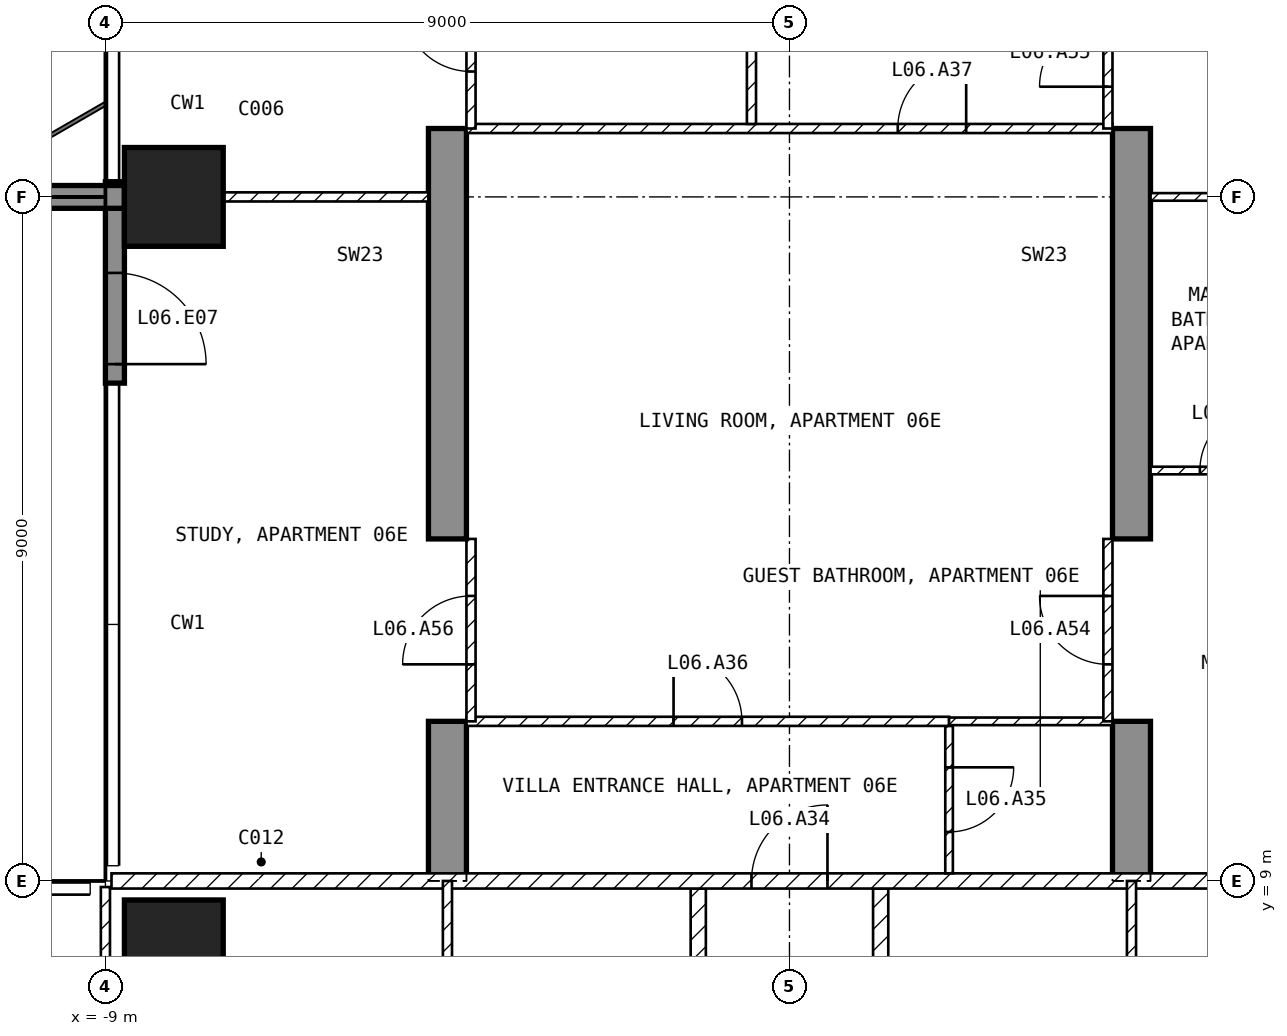
"""IFC4 building model, lengths in metres.
Left out: names, types, materials, properties, quantities, classifications, styles, units other than length and angle.
Written with IfcOpenShell. Run it as: python <this file> out.ifc"""

import sys

from ifc_helpers import new_model, si_unit, direction, frame, frame_2d, origin, origin_2d, place, context, subcontext, project, spatial, polyline, rectangle, outline, extrude, element, fill, save


model = new_model("IFC4")
c1 = context("Model", 3, precision=1e-05, world=origin(), true_north=direction((0.0, 1.0)))
c2 = subcontext(c1, "Body", "Model", "MODEL_VIEW")
j1 = project(units=[si_unit("LENGTHUNIT", "METRE"), si_unit("PLANEANGLEUNIT", "RADIAN")], contexts=[c1])
p1 = place(None, origin())
s1 = spatial("IfcSite", under=j1, at=p1, CompositionType="ELEMENT")
p2 = place(p1, origin())
s2 = spatial("IfcBuilding", under=s1, at=p2, CompositionType="ELEMENT")
p3 = place(p2, frame((0.0, 0.0, 40.0)))
s3 = spatial("IfcBuildingStorey", under=s2, at=p3, CompositionType="ELEMENT", Elevation=40.0)
for number, where, z_axis, x_axis in (
    (1, (-8.1, 8.1, -0.25), (0.0, 0.0, 1.0), (1.0, 0.0, 0.0)),
    (2, (-8.1, 18.0, -0.25), (0.0, 0.0, 1.0), (1.0, 0.0, 0.0)),
):
    element("IfcColumn", number, at=place(p3, frame(where, z_axis=z_axis, x_axis=x_axis)), inside=s3, PredefinedType="COLUMN", context=c2, shape_type="SweptSolid", body=[
        extrude(rectangle(XDim=1.3, YDim=1.3, at=origin_2d()), origin(), (0.0, 0.0, 1.0), 3.5),
    ])
for number, where, z_axis, x_axis in (
    (3, (-4.75, 9.0, -0.25), (1.0, 0.0, 0.0), (0.0, 1.0, 0.0)),
    (4, (4.25, 9.0, -0.25), (1.0, 0.0, 0.0), (0.0, 1.0, 0.0)),
):
    element("IfcWall", number, at=place(p3, frame(where, z_axis=z_axis, x_axis=x_axis)), inside=s3, PredefinedType="SHEAR", context=c2, shape_type="SweptSolid", body=[
        extrude(outline(polyline([(0.0, 0.0), (2.1, 0.0), (2.1, 2.65), (4.5, 2.65), (4.5, 0.0), (9.9, 0.0), (9.9, 2.65), (12.3, 2.65), (12.3, 0.0), (16.45, 0.0), (16.45, 3.5), (0.0, 3.5), (0.0, 0.0)])), origin(), (0.0, 0.0, 1.0), 0.5),
    ])
p4 = place(p3, frame((-8.875, 18.2, 0.0), z_axis=(0.0, 0.0, 1.0), x_axis=(0.0, -1.0, 0.0)))
e5 = element("IfcWall", 5, at=p4, inside=s3, PredefinedType="SOLIDWALL", context=c2, shape_type="SweptSolid", body=[
    extrude(rectangle(XDim=2.65, YDim=0.25, at=frame_2d((1.325, 0.0))), origin(), (0.0, 0.0, 1.0), 3.25),
])
p5 = place(p4, frame((1.2, 0.0, 0.0)))
e6 = element("IfcOpeningElement", 6, at=p5, cuts=e5, PredefinedType="OPENING", context=c2, shape_type="SweptSolid", body=[
    extrude(rectangle(XDim=1.2, YDim=2.4, at=frame_2d((0.6, 1.2))), frame((0.0, 0.135, 0.0), z_axis=(0.0, -1.0, 0.0), x_axis=(1.0, 0.0, 0.0)), (0.0, 0.0, 1.0), 0.27),
])
p6 = place(p3, frame((-8.75, 18.0, 0.0), z_axis=(0.0, 0.0, 1.0), x_axis=(-1.0, 0.0, 0.0)))
e7 = element("IfcWall", 7, at=p6, inside=s3, PredefinedType="SOLIDWALL", context=c2, shape_type="SweptSolid", body=[
    extrude(rectangle(XDim=2.95, YDim=0.3, at=frame_2d((1.475, 0.0))), origin(), (0.0, 0.0, 1.0), 3.25),
])
for number, where, z_axis, x_axis in (
    (8, (1.2, 8.9, 0.0), (0.0, 0.0, 1.0), (0.0, -1.0, 0.0)),
    (9, (-1.2, 1.3, 0.0), (0.0, 0.0, 1.0), (0.0, 1.0, 0.0)),
):
    element("IfcWall", number, at=place(p3, frame(where, z_axis=z_axis, x_axis=x_axis)), inside=s3, PredefinedType="PARTITIONING", context=c2, shape_type="SweptSolid", body=[
        extrude(rectangle(XDim=7.6, YDim=0.2, at=frame_2d((3.8, 0.0))), origin(), (0.0, 0.0, 1.0), 3.25),
    ])
p7 = place(p3, frame((-8.92, 9.0, 0.0), z_axis=(0.0, 0.0, 1.0), x_axis=(1.0, 0.0, 0.0)))
e10 = element("IfcWall", 10, at=p7, inside=s3, PredefinedType="PARTITIONING", context=c2, shape_type="SweptSolid", body=[
    extrude(rectangle(XDim=17.84, YDim=0.2, at=frame_2d((8.92, 0.0))), origin(), (0.0, 0.0, 1.0), 3.25),
])
p8 = place(p7, frame((8.42, 0.0, 0.0)))
e11 = element("IfcOpeningElement", 11, at=p8, cuts=e10, PredefinedType="OPENING", context=c2, shape_type="SweptSolid", body=[
    extrude(rectangle(XDim=1.0, YDim=2.1, at=frame_2d((0.5, 1.05))), frame((0.0, 0.11, 0.0), z_axis=(0.0, -1.0, 0.0), x_axis=(1.0, 0.0, 0.0)), (0.0, 0.0, 1.0), 0.22),
])
p9 = place(p3, frame((4.5, 5.1, 0.0), z_axis=(0.0, 0.0, 1.0), x_axis=(0.0, 1.0, 0.0)))
e12 = element("IfcWall", 12, at=p9, inside=s3, PredefinedType="PARTITIONING", context=c2, shape_type="SweptSolid", body=[
    extrude(rectangle(XDim=3.9, YDim=0.12, at=frame_2d((1.95, 0.0))), origin(), (0.0, 0.0, 1.0), 3.25),
])
p10 = place(p9, frame((1.5, 0.0, 0.0)))
e13 = element("IfcOpeningElement", 13, at=p10, cuts=e12, PredefinedType="OPENING", context=c2, shape_type="SweptSolid", body=[
    extrude(rectangle(XDim=0.9, YDim=2.1, at=frame_2d((0.45, 1.05))), frame((0.0, 0.07, 0.0), z_axis=(0.0, -1.0, 0.0), x_axis=(1.0, 0.0, 0.0)), (0.0, 0.0, 1.0), 0.14),
])
p11 = place(p3, frame((-9.0, 8.92, 0.0), z_axis=(0.0, 0.0, 1.0), x_axis=(0.0, -1.0, 0.0)))
e14 = element("IfcWall", 14, at=p11, inside=s3, PredefinedType="PARTITIONING", context=c2, shape_type="SweptSolid", body=[
    extrude(rectangle(XDim=5.02, YDim=0.12, at=frame_2d((2.51, 0.0))), origin(), (0.0, 0.0, 1.0), 3.25),
])
p12 = place(p11, frame((2.682, 0.0, 0.0)))
e15 = element("IfcOpeningElement", 15, at=p12, cuts=e14, PredefinedType="OPENING", context=c2, shape_type="SweptSolid", body=[
    extrude(rectangle(XDim=0.9, YDim=2.1, at=frame_2d((0.45, 1.05))), frame((0.0, 0.07, 0.0), z_axis=(0.0, -1.0, 0.0), x_axis=(1.0, 0.0, 0.0)), (0.0, 0.0, 1.0), 0.14),
])
p13 = place(p3, frame((-4.5, 9.0, 0.0), z_axis=(0.0, 0.0, 1.0), x_axis=(0.0, -1.0, 0.0)))
e16 = element("IfcWall", 16, at=p13, inside=s3, PredefinedType="PARTITIONING", context=c2, shape_type="SweptSolid", body=[
    extrude(rectangle(XDim=7.7, YDim=0.12, at=frame_2d((3.85, 0.0))), origin(), (0.0, 0.0, 1.0), 3.25),
])
p14 = place(p13, frame((1.812, 0.0, 0.0)))
e17 = element("IfcOpeningElement", 17, at=p14, cuts=e16, PredefinedType="OPENING", context=c2, shape_type="SweptSolid", body=[
    extrude(rectangle(XDim=0.9, YDim=2.1, at=frame_2d((0.45, 1.05))), frame((0.0, 0.07, 0.0), z_axis=(0.0, -1.0, 0.0), x_axis=(1.0, 0.0, 0.0)), (0.0, 0.0, 1.0), 0.14),
])
p15 = place(p3, frame((2.1, 11.04, 0.0), z_axis=(0.0, 0.0, 1.0), x_axis=(0.0, -1.0, 0.0)))
e18 = element("IfcWall", 18, at=p15, inside=s3, PredefinedType="PARTITIONING", context=c2, shape_type="SweptSolid", body=[
    extrude(rectangle(XDim=1.94, YDim=0.1, at=frame_2d((0.97, 0.0))), origin(), (0.0, 0.0, 1.0), 3.25),
])
p16 = place(p15, frame((0.545, 0.0, 0.0)))
e19 = element("IfcOpeningElement", 19, at=p16, cuts=e18, PredefinedType="OPENING", context=c2, shape_type="SweptSolid", body=[
    extrude(rectangle(XDim=0.85, YDim=2.1, at=frame_2d((0.425, 1.05))), frame((0.0, 0.06, 0.0), z_axis=(0.0, -1.0, 0.0), x_axis=(1.0, 0.0, 0.0)), (0.0, 0.0, 1.0), 0.12),
])
p17 = place(p3, frame((-4.25, 11.1, 0.0), z_axis=(0.0, 0.0, 1.0), x_axis=(1.0, 0.0, 0.0)))
e20 = element("IfcWall", 20, at=p17, inside=s3, PredefinedType="PARTITIONING", context=c2, shape_type="SweptSolid", body=[
    extrude(rectangle(XDim=6.35, YDim=0.12, at=frame_2d((3.175, 0.0))), origin(), (0.0, 0.0, 1.0), 3.25),
])
p18 = place(p17, frame((2.725, 0.0, 0.0)))
e21 = element("IfcOpeningElement", 21, at=p18, cuts=e20, PredefinedType="OPENING", context=c2, shape_type="SweptSolid", body=[
    extrude(rectangle(XDim=0.9, YDim=2.1, at=frame_2d((0.45, 1.05))), frame((0.0, 0.07, 0.0), z_axis=(0.0, -1.0, 0.0), x_axis=(1.0, 0.0, 0.0)), (0.0, 0.0, 1.0), 0.14),
])
p19 = place(p3, frame((2.1, 11.1, 0.0), z_axis=(0.0, 0.0, 1.0), x_axis=(1.0, 0.0, 0.0)))
e22 = element("IfcWall", 22, at=p19, inside=s3, PredefinedType="PARTITIONING", context=c2, shape_type="SweptSolid", body=[
    extrude(rectangle(XDim=2.15, YDim=0.1, at=frame_2d((1.075, 0.0))), origin(), (0.0, 0.0, 1.0), 3.25),
])
p20 = place(p3, frame((-4.25, 18.9, 0.0), z_axis=(0.0, 0.0, 1.0), x_axis=(1.0, 0.0, 0.0)))
e23 = element("IfcWall", 23, at=p20, inside=s3, PredefinedType="PARTITIONING", context=c2, shape_type="SweptSolid", body=[
    extrude(rectangle(XDim=8.5, YDim=0.12, at=frame_2d((4.25, 0.0))), origin(), (0.0, 0.0, 1.0), 3.25),
])
p21 = place(p20, frame((5.675, 0.0, 0.0)))
e24 = element("IfcOpeningElement", 24, at=p21, cuts=e23, PredefinedType="OPENING", context=c2, shape_type="SweptSolid", body=[
    extrude(rectangle(XDim=0.9, YDim=2.1, at=frame_2d((0.45, 1.05))), frame((0.0, 0.07, 0.0), z_axis=(0.0, -1.0, 0.0), x_axis=(1.0, 0.0, 0.0)), (0.0, 0.0, 1.0), 0.14),
])
p22 = place(p3, frame((-0.5, 18.96, 0.0), z_axis=(0.0, 0.0, 1.0), x_axis=(0.0, 1.0, 0.0)))
e25 = element("IfcWall", 25, at=p22, inside=s3, PredefinedType="PARTITIONING", context=c2, shape_type="SweptSolid", body=[
    extrude(rectangle(XDim=4.38, YDim=0.12, at=frame_2d((2.19, 0.0))), origin(), (0.0, 0.0, 1.0), 3.25),
])
p23 = place(p22, frame((1.74, 0.0, 0.0)))
e26 = element("IfcOpeningElement", 26, at=p23, cuts=e25, PredefinedType="OPENING", context=c2, shape_type="SweptSolid", body=[
    extrude(rectangle(XDim=0.9, YDim=2.1, at=frame_2d((0.45, 1.05))), frame((0.0, 0.07, 0.0), z_axis=(0.0, -1.0, 0.0), x_axis=(1.0, 0.0, 0.0)), (0.0, 0.0, 1.0), 0.14),
])
p24 = place(p3, frame((4.75, 14.4, 0.0), z_axis=(0.0, 0.0, 1.0), x_axis=(1.0, 0.0, 0.0)))
e27 = element("IfcWall", 27, at=p24, inside=s3, PredefinedType="PARTITIONING", context=c2, shape_type="SweptSolid", body=[
    extrude(rectangle(XDim=2.2, YDim=0.1, at=frame_2d((1.1, 0.0))), origin(), (0.0, 0.0, 1.0), 3.25),
])
p25 = place(p24, frame((0.65, 0.0, 0.0)))
e28 = element("IfcOpeningElement", 28, at=p25, cuts=e27, PredefinedType="OPENING", context=c2, shape_type="SweptSolid", body=[
    extrude(rectangle(XDim=0.85, YDim=2.1, at=frame_2d((0.425, 1.05))), frame((0.0, 0.06, 0.0), z_axis=(0.0, -1.0, 0.0), x_axis=(1.0, 0.0, 0.0)), (0.0, 0.0, 1.0), 0.12),
])
p26 = place(p3, frame((4.75, 18.0, 0.0), z_axis=(0.0, 0.0, 1.0), x_axis=(1.0, 0.0, 0.0)))
e29 = element("IfcWall", 29, at=p26, inside=s3, PredefinedType="PARTITIONING", context=c2, shape_type="SweptSolid", body=[
    extrude(rectangle(XDim=2.15, YDim=0.1, at=frame_2d((1.075, 0.0))), origin(), (0.0, 0.0, 1.0), 2.346),
])
p27 = place(p3, frame((-7.45, 18.0, 0.0), z_axis=(0.0, 0.0, 1.0), x_axis=(1.0, 0.0, 0.0)))
e30 = element("IfcWall", 30, at=p27, inside=s3, PredefinedType="PARTITIONING", context=c2, shape_type="SweptSolid", body=[
    extrude(rectangle(XDim=2.7, YDim=0.12, at=frame_2d((1.35, 0.0))), origin(), (0.0, 0.0, 1.0), 2.346),
])
p28 = place(p3, frame((4.19, 11.1, 0.0), z_axis=(0.0, 0.0, 1.0), x_axis=(0.0, 1.0, 0.0)))
e31 = element("IfcWall", 31, at=p28, inside=s3, PredefinedType="PARTITIONING", context=c2, shape_type="SweptSolid", body=[
    extrude(rectangle(XDim=2.4, YDim=0.12, at=frame_2d((1.2, 0.0))), origin(), (0.0, 0.0, 1.0), 2.4),
])
p29 = place(p28, frame((0.75, 0.0, 0.0)))
e32 = element("IfcOpeningElement", 32, at=p29, cuts=e31, PredefinedType="OPENING", context=c2, shape_type="SweptSolid", body=[
    extrude(rectangle(XDim=0.9, YDim=2.1, at=frame_2d((0.45, 1.05))), frame((0.0, 0.07, 0.0), z_axis=(0.0, -1.0, 0.0), x_axis=(1.0, 0.0, 0.0)), (0.0, 0.0, 1.0), 0.14),
])
p30 = place(p3, frame((4.19, 18.9, 0.0), z_axis=(0.0, 0.0, 1.0), x_axis=(0.0, 1.0, 0.0)))
e33 = element("IfcWall", 33, at=p30, inside=s3, PredefinedType="PARTITIONING", context=c2, shape_type="SweptSolid", body=[
    extrude(rectangle(XDim=2.4, YDim=0.12, at=frame_2d((1.2, 0.0))), origin(), (0.0, 0.0, 1.0), 2.4),
])
p31 = place(p30, frame((0.55, 0.0, 0.0)))
e34 = element("IfcOpeningElement", 34, at=p31, cuts=e33, PredefinedType="OPENING", context=c2, shape_type="SweptSolid", body=[
    extrude(rectangle(XDim=0.9, YDim=2.1, at=frame_2d((0.45, 1.05))), frame((0.0, 0.07, 0.0), z_axis=(0.0, -1.0, 0.0), x_axis=(1.0, 0.0, 0.0)), (0.0, 0.0, 1.0), 0.14),
])
p32 = place(p3, frame((-4.19, 11.1, 0.0), z_axis=(0.0, 0.0, 1.0), x_axis=(0.0, 1.0, 0.0)))
e35 = element("IfcWall", 35, at=p32, inside=s3, PredefinedType="PARTITIONING", context=c2, shape_type="SweptSolid", body=[
    extrude(rectangle(XDim=2.4, YDim=0.12, at=frame_2d((1.2, 0.0))), origin(), (0.0, 0.0, 1.0), 2.4),
])
p33 = place(p32, frame((0.75, 0.0, 0.0)))
e36 = element("IfcOpeningElement", 36, at=p33, cuts=e35, PredefinedType="OPENING", context=c2, shape_type="SweptSolid", body=[
    extrude(rectangle(XDim=0.9, YDim=2.1, at=frame_2d((0.45, 1.05))), frame((0.0, 0.07, 0.0), z_axis=(0.0, -1.0, 0.0), x_axis=(1.0, 0.0, 0.0)), (0.0, 0.0, 1.0), 0.14),
])
p34 = place(p3, frame((-4.19, 18.9, 0.0), z_axis=(0.0, 0.0, 1.0), x_axis=(0.0, 1.0, 0.0)))
e37 = element("IfcWall", 37, at=p34, inside=s3, PredefinedType="PARTITIONING", context=c2, shape_type="SweptSolid", body=[
    extrude(rectangle(XDim=2.4, YDim=0.12, at=frame_2d((1.2, 0.0))), origin(), (0.0, 0.0, 1.0), 2.4),
])
p35 = place(p34, frame((0.75, 0.0, 0.0)))
e38 = element("IfcOpeningElement", 38, at=p35, cuts=e37, PredefinedType="OPENING", context=c2, shape_type="SweptSolid", body=[
    extrude(rectangle(XDim=0.9, YDim=2.1, at=frame_2d((0.45, 1.05))), frame((0.0, 0.07, 0.0), z_axis=(0.0, -1.0, 0.0), x_axis=(1.0, 0.0, 0.0)), (0.0, 0.0, 1.0), 0.14),
])
p36 = place(p5, origin())
e39 = element("IfcDoor", 39, at=p36, inside=s3, OperationType="SINGLE_SWING_RIGHT", PredefinedType="DOOR", context=c2, shape_type="SweptSolid", body=[
    extrude(rectangle(XDim=1.2, YDim=2.4, at=frame_2d((0.6, 1.2))), frame((0.0, 0.025, 0.0), z_axis=(0.0, -1.0, 0.0), x_axis=(1.0, 0.0, 0.0)), (0.0, 0.0, 1.0), 0.05),
])
fill(e6, e39)
p37 = place(p8, origin())
e40 = element("IfcDoor", 40, at=p37, inside=s3, OperationType="SINGLE_SWING_RIGHT", PredefinedType="DOOR", context=c2, shape_type="SweptSolid", body=[
    extrude(rectangle(XDim=1.0, YDim=2.1, at=frame_2d((0.5, 1.05))), frame((0.0, 0.025, 0.0), z_axis=(0.0, -1.0, 0.0), x_axis=(1.0, 0.0, 0.0)), (0.0, 0.0, 1.0), 0.05),
])
fill(e11, e40)
p38 = place(p16, origin())
e41 = element("IfcDoor", 41, at=p38, inside=s3, OperationType="SINGLE_SWING_LEFT", PredefinedType="DOOR", context=c2, shape_type="SweptSolid", body=[
    extrude(rectangle(XDim=0.85, YDim=2.1, at=frame_2d((0.425, 1.05))), frame((0.0, 0.025, 0.0), z_axis=(0.0, -1.0, 0.0), x_axis=(1.0, 0.0, 0.0)), (0.0, 0.0, 1.0), 0.05),
])
fill(e19, e41)
p39 = place(p18, origin())
e42 = element("IfcDoor", 42, at=p39, inside=s3, OperationType="SINGLE_SWING_LEFT", PredefinedType="DOOR", context=c2, shape_type="SweptSolid", body=[
    extrude(rectangle(XDim=0.9, YDim=2.1, at=frame_2d((0.45, 1.05))), frame((0.0, 0.025, 0.0), z_axis=(0.0, -1.0, 0.0), x_axis=(1.0, 0.0, 0.0)), (0.0, 0.0, 1.0), 0.05),
])
fill(e21, e42)
p40 = place(p21, origin())
e43 = element("IfcDoor", 43, at=p40, inside=s3, OperationType="SINGLE_SWING_RIGHT", PredefinedType="DOOR", context=c2, shape_type="SweptSolid", body=[
    extrude(rectangle(XDim=0.9, YDim=2.1, at=frame_2d((0.45, 1.05))), frame((0.0, 0.025, 0.0), z_axis=(0.0, -1.0, 0.0), x_axis=(1.0, 0.0, 0.0)), (0.0, 0.0, 1.0), 0.05),
])
fill(e24, e43)
p41 = place(p25, origin())
e44 = element("IfcDoor", 44, at=p41, inside=s3, OperationType="SINGLE_SWING_RIGHT", PredefinedType="DOOR", context=c2, shape_type="SweptSolid", body=[
    extrude(rectangle(XDim=0.85, YDim=2.1, at=frame_2d((0.425, 1.05))), frame((0.0, 0.025, 0.0), z_axis=(0.0, -1.0, 0.0), x_axis=(1.0, 0.0, 0.0)), (0.0, 0.0, 1.0), 0.05),
])
fill(e28, e44)
p42 = place(p29, origin())
e45 = element("IfcDoor", 45, at=p42, inside=s3, OperationType="SINGLE_SWING_RIGHT", PredefinedType="DOOR", context=c2, shape_type="SweptSolid", body=[
    extrude(rectangle(XDim=0.9, YDim=2.1, at=frame_2d((0.45, 1.05))), frame((0.0, 0.025, 0.0), z_axis=(0.0, -1.0, 0.0), x_axis=(1.0, 0.0, 0.0)), (0.0, 0.0, 1.0), 0.05),
])
fill(e32, e45)
p43 = place(p31, origin())
e46 = element("IfcDoor", 46, at=p43, inside=s3, OperationType="SINGLE_SWING_LEFT", PredefinedType="DOOR", context=c2, shape_type="SweptSolid", body=[
    extrude(rectangle(XDim=0.9, YDim=2.1, at=frame_2d((0.45, 1.05))), frame((0.0, 0.025, 0.0), z_axis=(0.0, -1.0, 0.0), x_axis=(1.0, 0.0, 0.0)), (0.0, 0.0, 1.0), 0.05),
])
fill(e34, e46)
p44 = place(p33, origin())
e47 = element("IfcDoor", 47, at=p44, inside=s3, OperationType="SINGLE_SWING_LEFT", PredefinedType="DOOR", context=c2, shape_type="SweptSolid", body=[
    extrude(rectangle(XDim=0.9, YDim=2.1, at=frame_2d((0.45, 1.05))), frame((0.0, 0.025, 0.0), z_axis=(0.0, -1.0, 0.0), x_axis=(1.0, 0.0, 0.0)), (0.0, 0.0, 1.0), 0.05),
])
fill(e36, e47)
p45 = place(p35, origin())
e48 = element("IfcDoor", 48, at=p45, inside=s3, OperationType="SINGLE_SWING_RIGHT", PredefinedType="DOOR", context=c2, shape_type="SweptSolid", body=[
    extrude(rectangle(XDim=0.9, YDim=2.1, at=frame_2d((0.45, 1.05))), frame((0.0, 0.025, 0.0), z_axis=(0.0, -1.0, 0.0), x_axis=(1.0, 0.0, 0.0)), (0.0, 0.0, 1.0), 0.05),
])
fill(e38, e48)
save(model, sys.argv[1])
